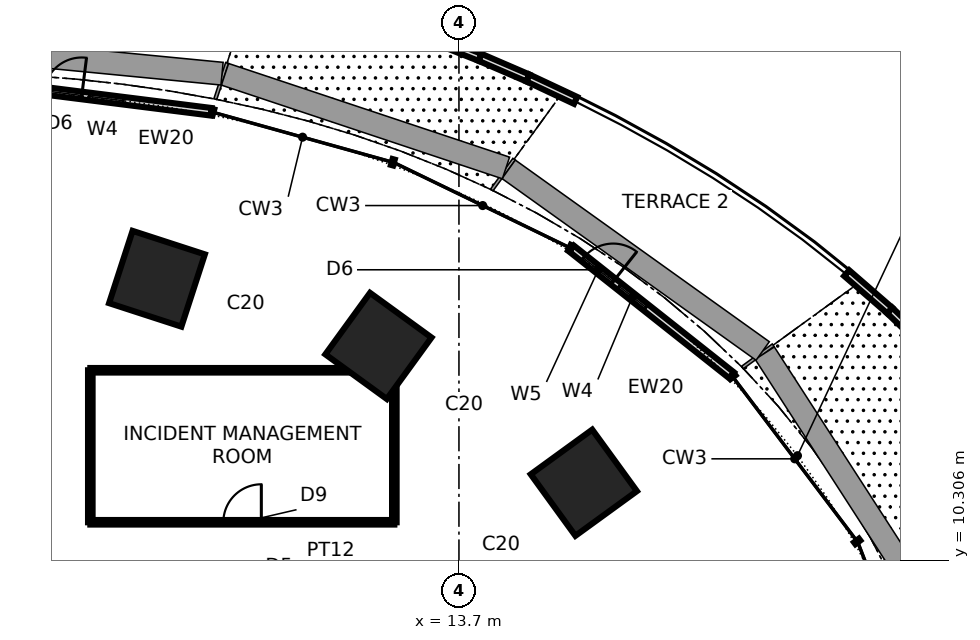
"""IFC4 building model, lengths in metres.
Left out: names, types, materials, properties, quantities, classifications, styles, units other than length and angle.
Written with IfcOpenShell. Run it as: python <this file> out.ifc"""

import sys

from ifc_helpers import new_model, si_unit, direction, frame, frame_2d, origin, origin_2d, place, context, subcontext, project, spatial, rectangle, extrude, element, fill, save


model = new_model("IFC4")
c1 = context("Model", 3, precision=1e-05, world=origin(), true_north=direction((0.0, 1.0)))
c2 = subcontext(c1, "Body", "Model", "MODEL_VIEW")
j1 = project(units=[si_unit("LENGTHUNIT", "METRE"), si_unit("PLANEANGLEUNIT", "RADIAN")], contexts=[c1])
p1 = place(None, origin())
s1 = spatial("IfcSite", under=j1, at=p1, CompositionType="ELEMENT")
p2 = place(p1, origin())
s2 = spatial("IfcBuilding", under=s1, at=p2, CompositionType="ELEMENT")
p3 = place(p2, frame((0.0, 0.0, 19.6)))
s3 = spatial("IfcBuildingStorey", under=s2, at=p3, CompositionType="ELEMENT", Elevation=19.6)
for number, where, z_axis, x_axis in (
    (1, (16.986, 12.341, 0.0), (0.0, 0.0, 1.0), (0.809, 0.588, 0.0)),
    (2, (11.581, 15.94, 0.0), (0.0, 0.0, 1.0), (0.588, 0.809, 0.0)),
    (3, (5.754, 17.708, 0.0), (0.0, 0.0, 1.0), (0.309, 0.951, 0.0)),
):
    element("IfcColumn", number, at=place(p3, frame(where, z_axis=z_axis, x_axis=x_axis)), inside=s3, PredefinedType="COLUMN", context=c2, shape_type="SweptSolid", body=[
        extrude(rectangle(XDim=2.0, YDim=2.0, at=origin_2d()), origin(), (0.0, 0.0, 1.0), 4.2),
    ])
p4 = place(p3, frame((20.875, 15.167, 0.0), z_axis=(0.0, 0.0, 1.0), x_axis=(-0.784092788378, 0.620643616912, 0.0)))
e4 = element("IfcWall", 4, at=p4, inside=s3, PredefinedType="SOLIDWALL", context=c2, shape_type="SweptSolid", body=[
    extrude(rectangle(XDim=5.376, YDim=0.2, at=frame_2d((2.688, 0.0))), origin(), (0.0, 0.0, 1.0), 4.04),
])
p5 = place(p4, frame((3.976, 0.0, 0.0)))
e5 = element("IfcOpeningElement", 5, at=p5, cuts=e4, PredefinedType="OPENING", context=c2, shape_type="SweptSolid", body=[
    extrude(rectangle(XDim=1.0, YDim=2.4, at=frame_2d((0.5, 1.2))), frame((0.0, 0.11, 0.0), z_axis=(0.0, -1.0, 0.0), x_axis=(1.0, 0.0, 0.0)), (0.0, 0.0, 1.0), 0.22),
])
p6 = place(p4, frame((2.876, 0.0, 0.3)))
e6 = element("IfcOpeningElement", 6, at=p6, cuts=e4, PredefinedType="OPENING", context=c2, shape_type="SweptSolid", body=[
    extrude(rectangle(XDim=0.9, YDim=2.1, at=frame_2d((0.45, 1.05))), frame((0.0, 0.11, 0.0), z_axis=(0.0, -1.0, 0.0), x_axis=(1.0, 0.0, 0.0)), (0.0, 0.0, 1.0), 0.22),
])
p7 = place(p4, frame((3.976, 0.0, 2.7)))
e7 = element("IfcOpeningElement", 7, at=p7, cuts=e4, PredefinedType="OPENING", context=c2, shape_type="SweptSolid", body=[
    extrude(rectangle(XDim=1.0, YDim=0.6, at=frame_2d((0.5, 0.3))), frame((0.0, 0.11, 0.0), z_axis=(0.0, -1.0, 0.0), x_axis=(1.0, 0.0, 0.0)), (0.0, 0.0, 1.0), 0.22),
])
p8 = place(p3, frame((7.182, 22.103, 0.0), z_axis=(0.0, 0.0, 1.0), x_axis=(-0.992172605172, 0.124874022707, 0.0)))
e8 = element("IfcWall", 8, at=p8, inside=s3, PredefinedType="SOLIDWALL", context=c2, shape_type="SweptSolid", body=[
    extrude(rectangle(XDim=4.833, YDim=0.2, at=frame_2d((2.417, 0.0))), origin(), (0.0, 0.0, 1.0), 4.04),
])
p9 = place(p8, frame((3.433, 0.0, 0.0)))
e9 = element("IfcOpeningElement", 9, at=p9, cuts=e8, PredefinedType="OPENING", context=c2, shape_type="SweptSolid", body=[
    extrude(rectangle(XDim=1.0, YDim=2.4, at=frame_2d((0.5, 1.2))), frame((0.0, 0.11, 0.0), z_axis=(0.0, -1.0, 0.0), x_axis=(1.0, 0.0, 0.0)), (0.0, 0.0, 1.0), 0.22),
])
p10 = place(p8, frame((2.333, 0.0, 0.3)))
e10 = element("IfcOpeningElement", 10, at=p10, cuts=e8, PredefinedType="OPENING", context=c2, shape_type="SweptSolid", body=[
    extrude(rectangle(XDim=0.9, YDim=2.1, at=frame_2d((0.45, 1.05))), frame((0.0, 0.11, 0.0), z_axis=(0.0, -1.0, 0.0), x_axis=(1.0, 0.0, 0.0)), (0.0, 0.0, 1.0), 0.22),
])
p11 = place(p8, frame((3.433, 0.0, 2.7)))
e11 = element("IfcOpeningElement", 11, at=p11, cuts=e8, PredefinedType="OPENING", context=c2, shape_type="SweptSolid", body=[
    extrude(rectangle(XDim=1.0, YDim=0.6, at=frame_2d((0.5, 0.3))), frame((0.0, 0.11, 0.0), z_axis=(0.0, -1.0, 0.0), x_axis=(1.0, 0.0, 0.0)), (0.0, 0.0, 1.0), 0.22),
])
p12 = place(p3, frame((26.127, 15.823, 0.0), z_axis=(0.0, 0.0, 1.0), x_axis=(-0.72081759541, 0.693124804164, 0.0)))
e12 = element("IfcWall", 12, at=p12, inside=s3, PredefinedType="PARAPET", context=c2, shape_type="SweptSolid", body=[
    extrude(rectangle(XDim=1.516, YDim=0.2, at=frame_2d((0.758, 0.0))), origin(), (0.0, 0.0, 1.0), 1.1),
])
p13 = place(p3, frame((25.034, 16.874, 0.0), z_axis=(0.0, 0.0, 1.0), x_axis=(-0.754941905039, 0.65579167425, 0.0)))
e13 = element("IfcWall", 13, at=p13, inside=s3, PredefinedType="PARAPET", context=c2, shape_type="SweptSolid", body=[
    extrude(rectangle(XDim=1.5, YDim=0.2, at=frame_2d((0.75, 0.0))), origin(), (0.0, 0.0, 1.0), 1.1),
])
p14 = place(p3, frame((16.77, 22.402, 0.0), z_axis=(0.0, 0.0, 1.0), x_axis=(-0.905165145574, 0.425060065447, 0.0)))
e14 = element("IfcWall", 14, at=p14, inside=s3, PredefinedType="PARAPET", context=c2, shape_type="SweptSolid", body=[
    extrude(rectangle(XDim=1.388, YDim=0.2, at=frame_2d((0.694, 0.0))), origin(), (0.0, 0.0, 1.0), 1.1),
])
p15 = place(p3, frame((15.513, 22.992, 0.0), z_axis=(0.0, 0.0, 1.0), x_axis=(-0.918351953195, 0.395764690269, 0.0)))
e15 = element("IfcWall", 15, at=p15, inside=s3, PredefinedType="PARAPET", context=c2, shape_type="SweptSolid", body=[
    extrude(rectangle(XDim=1.373, YDim=0.2, at=frame_2d((0.686, 0.0))), origin(), (0.0, 0.0, 1.0), 1.1),
])
p16 = place(p3, frame((14.253, 23.535, 0.0), z_axis=(0.0, 0.0, 1.0), x_axis=(-0.929932135138, 0.367731184479, 0.0)))
e16 = element("IfcWall", 16, at=p16, inside=s3, PredefinedType="PARAPET", context=c2, shape_type="SweptSolid", body=[
    extrude(rectangle(XDim=1.358, YDim=0.2, at=frame_2d((0.679, 0.0))), origin(), (0.0, 0.0, 1.0), 1.1),
])
p17 = place(p3, frame((12.0, 15.3, 0.0), z_axis=(0.0, 0.0, 1.0), x_axis=(0.0, -1.0, 0.0)))
e17 = element("IfcWall", 17, at=p17, inside=s3, PredefinedType="PARTITIONING", context=c2, shape_type="SweptSolid", body=[
    extrude(rectangle(XDim=4.0, YDim=0.12, at=frame_2d((2.0, 0.0))), origin(), (0.0, 0.0, 1.0), 4.04),
])
p18 = place(p3, frame((12.0, 11.3, 0.0), z_axis=(0.0, 0.0, 1.0), x_axis=(-1.0, 0.0, 0.0)))
e18 = element("IfcWall", 18, at=p18, inside=s3, PredefinedType="PARTITIONING", context=c2, shape_type="SweptSolid", body=[
    extrude(rectangle(XDim=8.0, YDim=0.12, at=frame_2d((4.0, 0.0))), origin(), (0.0, 0.0, 1.0), 4.04),
])
p19 = place(p18, frame((3.5, 0.0, 0.0)))
e19 = element("IfcOpeningElement", 19, at=p19, cuts=e18, PredefinedType="OPENING", context=c2, shape_type="SweptSolid", body=[
    extrude(rectangle(XDim=1.0, YDim=2.4, at=frame_2d((0.5, 1.2))), frame((0.0, 0.07, 0.0), z_axis=(0.0, -1.0, 0.0), x_axis=(1.0, 0.0, 0.0)), (0.0, 0.0, 1.0), 0.14),
])
p20 = place(p3, frame((4.0, 15.3, 0.0), z_axis=(0.0, 0.0, 1.0), x_axis=(1.0, 0.0, 0.0)))
e20 = element("IfcWall", 20, at=p20, inside=s3, PredefinedType="PARTITIONING", context=c2, shape_type="SweptSolid", body=[
    extrude(rectangle(XDim=8.0, YDim=0.12, at=frame_2d((4.0, 0.0))), origin(), (0.0, 0.0, 1.0), 4.04),
])
p21 = place(p3, frame((4.0, 11.3, 0.0), z_axis=(0.0, 0.0, 1.0), x_axis=(0.0, 1.0, 0.0)))
e21 = element("IfcWall", 21, at=p21, inside=s3, PredefinedType="PARTITIONING", context=c2, shape_type="SweptSolid", body=[
    extrude(rectangle(XDim=4.0, YDim=0.12, at=frame_2d((2.0, 0.0))), origin(), (0.0, 0.0, 1.0), 4.04),
])
p22 = place(p5, frame((1.0, 0.0, 0.0), z_axis=(0.0, 0.0, 1.0), x_axis=(-1.0, 0.0, 0.0)))
e22 = element("IfcDoor", 22, at=p22, inside=s3, OperationType="SINGLE_SWING_RIGHT", PredefinedType="DOOR", context=c2, shape_type="SweptSolid", body=[
    extrude(rectangle(XDim=1.0, YDim=2.4, at=frame_2d((0.5, 1.2))), frame((0.0, 0.025, 0.0), z_axis=(0.0, -1.0, 0.0), x_axis=(1.0, 0.0, 0.0)), (0.0, 0.0, 1.0), 0.05),
])
fill(e5, e22)
p23 = place(p6, origin())
e23 = element("IfcWindow", 23, at=p23, inside=s3, PartitioningType="SINGLE_PANEL", PredefinedType="WINDOW", context=c2, shape_type="SweptSolid", body=[
    extrude(rectangle(XDim=0.9, YDim=2.1, at=frame_2d((0.45, 1.05))), frame((0.0, 0.03, 0.0), z_axis=(0.0, -1.0, 0.0), x_axis=(1.0, 0.0, 0.0)), (0.0, 0.0, 1.0), 0.06),
])
fill(e6, e23)
p24 = place(p7, origin())
e24 = element("IfcWindow", 24, at=p24, inside=s3, PartitioningType="SINGLE_PANEL", PredefinedType="WINDOW", context=c2, shape_type="SweptSolid", body=[
    extrude(rectangle(XDim=1.0, YDim=0.6, at=frame_2d((0.5, 0.3))), frame((0.0, 0.03, 0.0), z_axis=(0.0, -1.0, 0.0), x_axis=(1.0, 0.0, 0.0)), (0.0, 0.0, 1.0), 0.06),
])
fill(e7, e24)
p25 = place(p9, frame((1.0, 0.0, 0.0), z_axis=(0.0, 0.0, 1.0), x_axis=(-1.0, 0.0, 0.0)))
e25 = element("IfcDoor", 25, at=p25, inside=s3, OperationType="SINGLE_SWING_RIGHT", PredefinedType="DOOR", context=c2, shape_type="SweptSolid", body=[
    extrude(rectangle(XDim=1.0, YDim=2.4, at=frame_2d((0.5, 1.2))), frame((0.0, 0.025, 0.0), z_axis=(0.0, -1.0, 0.0), x_axis=(1.0, 0.0, 0.0)), (0.0, 0.0, 1.0), 0.05),
])
fill(e9, e25)
p26 = place(p10, origin())
e26 = element("IfcWindow", 26, at=p26, inside=s3, PartitioningType="SINGLE_PANEL", PredefinedType="WINDOW", context=c2, shape_type="SweptSolid", body=[
    extrude(rectangle(XDim=0.9, YDim=2.1, at=frame_2d((0.45, 1.05))), frame((0.0, 0.03, 0.0), z_axis=(0.0, -1.0, 0.0), x_axis=(1.0, 0.0, 0.0)), (0.0, 0.0, 1.0), 0.06),
])
fill(e10, e26)
p27 = place(p11, origin())
e27 = element("IfcWindow", 27, at=p27, inside=s3, PartitioningType="SINGLE_PANEL", PredefinedType="WINDOW", context=c2, shape_type="SweptSolid", body=[
    extrude(rectangle(XDim=1.0, YDim=0.6, at=frame_2d((0.5, 0.3))), frame((0.0, 0.03, 0.0), z_axis=(0.0, -1.0, 0.0), x_axis=(1.0, 0.0, 0.0)), (0.0, 0.0, 1.0), 0.06),
])
fill(e11, e27)
p28 = place(p19, frame((1.0, 0.0, 0.0), z_axis=(0.0, 0.0, 1.0), x_axis=(-1.0, 0.0, 0.0)))
e28 = element("IfcDoor", 28, at=p28, inside=s3, OperationType="SINGLE_SWING_RIGHT", PredefinedType="DOOR", context=c2, shape_type="SweptSolid", body=[
    extrude(rectangle(XDim=1.0, YDim=2.4, at=frame_2d((0.5, 1.2))), frame((0.0, 0.025, 0.0), z_axis=(0.0, -1.0, 0.0), x_axis=(1.0, 0.0, 0.0)), (0.0, 0.0, 1.0), 0.05),
])
fill(e19, e28)
save(model, sys.argv[1])
